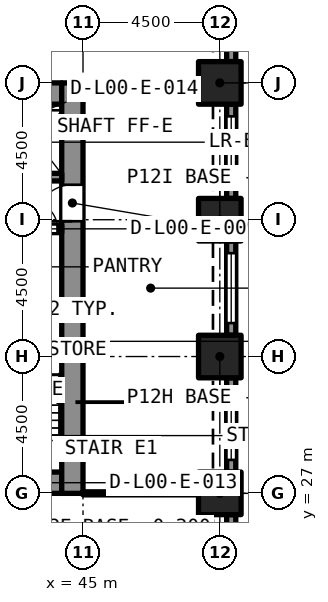
"""IFC4 building model, lengths in metres.
Left out: names, types, materials, properties, quantities, classifications, styles, units other than length and angle.
Written with IfcOpenShell. Run it as: python <this file> out.ifc"""

import sys

from ifc_helpers import new_model, si_unit, direction, frame, frame_2d, origin, origin_2d, place, context, subcontext, project, spatial, rectangle, extrude, element, fill, save


model = new_model("IFC4")
c1 = context("Model", 3, precision=1e-05, world=origin(), true_north=direction((0.0, 1.0)))
c2 = subcontext(c1, "Body", "Model", "MODEL_VIEW")
j1 = project(units=[si_unit("LENGTHUNIT", "METRE"), si_unit("PLANEANGLEUNIT", "RADIAN")], contexts=[c1])
p1 = place(None, origin())
s1 = spatial("IfcSite", under=j1, at=p1, CompositionType="ELEMENT")
p2 = place(p1, origin())
s2 = spatial("IfcBuilding", under=s1, at=p2, CompositionType="ELEMENT")
p3 = place(p2, origin())
s3 = spatial("IfcBuildingStorey", under=s2, at=p3, CompositionType="ELEMENT", Elevation=0.0)
for number, where, z_axis, x_axis in (
    (1, (49.5, 27.0, -0.3), (0.0, 0.0, 1.0), (1.0, 0.0, 0.0)),
    (2, (49.5, 31.5, -0.3), (0.0, 0.0, 1.0), (1.0, 0.0, 0.0)),
    (3, (49.5, 36.0, -0.3), (0.0, 0.0, 1.0), (1.0, 0.0, 0.0)),
    (4, (49.5, 40.5, -0.3), (0.0, 0.0, 1.0), (1.0, 0.0, 0.0)),
):
    element("IfcColumn", number, at=place(p3, frame(where, z_axis=z_axis, x_axis=x_axis)), inside=s3, PredefinedType="COLUMN", context=c2, shape_type="SweptSolid", body=[
        extrude(rectangle(XDim=1.4, YDim=1.4, at=origin_2d()), origin(), (0.0, 0.0, 1.0), 6.3),
    ])
p4 = place(p3, frame((36.7, 27.35, -0.3), z_axis=(0.0, 0.0, 1.0), x_axis=(1.0, 0.0, 0.0)))
e5 = element("IfcWall", 5, at=p4, inside=s3, PredefinedType="SOLIDWALL", context=c2, shape_type="SweptSolid", body=[
    extrude(rectangle(XDim=7.6, YDim=0.7, at=frame_2d((3.8, 0.0))), origin(), (0.0, 0.0, 1.0), 6.3),
])
p5 = place(p4, frame((5.775, 0.0, 0.3)))
e6 = element("IfcOpeningElement", 6, at=p5, cuts=e5, PredefinedType="OPENING", context=c2, shape_type="SweptSolid", body=[
    extrude(rectangle(XDim=1.1, YDim=2.1, at=frame_2d((0.55, 1.05))), frame((0.0, 0.36, 0.0), z_axis=(0.0, -1.0, 0.0), x_axis=(1.0, 0.0, 0.0)), (0.0, 0.0, 1.0), 0.72),
])
p6 = place(p4, frame((3.25, 0.0, 0.3)))
e7 = element("IfcOpeningElement", 7, at=p6, cuts=e5, PredefinedType="OPENING", context=c2, shape_type="SweptSolid", body=[
    extrude(rectangle(XDim=1.1, YDim=2.1, at=frame_2d((0.55, 1.05))), frame((0.0, 0.36, 0.0), z_axis=(0.0, -1.0, 0.0), x_axis=(1.0, 0.0, 0.0)), (0.0, 0.0, 1.0), 0.72),
])
p7 = place(p4, frame((0.725, 0.0, 0.3)))
e8 = element("IfcOpeningElement", 8, at=p7, cuts=e5, PredefinedType="OPENING", context=c2, shape_type="SweptSolid", body=[
    extrude(rectangle(XDim=1.1, YDim=2.1, at=frame_2d((0.55, 1.05))), frame((0.0, 0.36, 0.0), z_axis=(0.0, -1.0, 0.0), x_axis=(1.0, 0.0, 0.0)), (0.0, 0.0, 1.0), 0.72),
])
p8 = place(p3, frame((36.7, 40.15, -0.3), z_axis=(0.0, 0.0, 1.0), x_axis=(1.0, 0.0, 0.0)))
e9 = element("IfcWall", 9, at=p8, inside=s3, PredefinedType="SOLIDWALL", context=c2, shape_type="SweptSolid", body=[
    extrude(rectangle(XDim=7.6, YDim=0.7, at=frame_2d((3.8, 0.0))), origin(), (0.0, 0.0, 1.0), 6.3),
])
p9 = place(p3, frame((44.65, 27.0, -0.3), z_axis=(0.0, 0.0, 1.0), x_axis=(0.0, 1.0, 0.0)))
e10 = element("IfcWall", 10, at=p9, inside=s3, PredefinedType="SOLIDWALL", context=c2, shape_type="SweptSolid", body=[
    extrude(rectangle(XDim=13.5, YDim=0.7, at=frame_2d((6.75, 0.0))), origin(), (0.0, 0.0, 1.0), 6.3),
])
p10 = place(p9, frame((8.95, 0.0, 0.3)))
e11 = element("IfcOpeningElement", 11, at=p10, cuts=e10, PredefinedType="OPENING", context=c2, shape_type="SweptSolid", body=[
    extrude(rectangle(XDim=1.2, YDim=2.1, at=frame_2d((0.6, 1.05))), frame((0.0, 0.36, 0.0), z_axis=(0.0, -1.0, 0.0), x_axis=(1.0, 0.0, 0.0)), (0.0, 0.0, 1.0), 0.72),
])
p11 = place(p3, frame((49.875, 26.3, 0.0), z_axis=(0.0, 0.0, 1.0), x_axis=(0.0, -1.0, 0.0)))
e12 = element("IfcWall", 12, at=p11, inside=s3, PredefinedType="SOLIDWALL", context=c2, shape_type="SweptSolid", body=[
    extrude(rectangle(XDim=3.1, YDim=0.3, at=frame_2d((1.55, 0.0))), origin(), (0.0, 0.0, 1.0), 6.0),
])
p12 = place(p11, frame((0.4, 0.0, 0.45)))
e13 = element("IfcOpeningElement", 13, at=p12, cuts=e12, PredefinedType="OPENING", context=c2, shape_type="SweptSolid", body=[
    extrude(rectangle(XDim=2.3, YDim=3.3, at=frame_2d((1.15, 1.65))), frame((0.0, 0.16, 0.0), z_axis=(0.0, -1.0, 0.0), x_axis=(1.0, 0.0, 0.0)), (0.0, 0.0, 1.0), 0.32),
])
p13 = place(p3, frame((49.875, 30.8, 0.0), z_axis=(0.0, 0.0, 1.0), x_axis=(0.0, -1.0, 0.0)))
e14 = element("IfcWall", 14, at=p13, inside=s3, PredefinedType="SOLIDWALL", context=c2, shape_type="SweptSolid", body=[
    extrude(rectangle(XDim=3.1, YDim=0.3, at=frame_2d((1.55, 0.0))), origin(), (0.0, 0.0, 1.0), 6.0),
])
p14 = place(p13, frame((0.4, 0.0, 0.45)))
e15 = element("IfcOpeningElement", 15, at=p14, cuts=e14, PredefinedType="OPENING", context=c2, shape_type="SweptSolid", body=[
    extrude(rectangle(XDim=2.3, YDim=3.3, at=frame_2d((1.15, 1.65))), frame((0.0, 0.16, 0.0), z_axis=(0.0, -1.0, 0.0), x_axis=(1.0, 0.0, 0.0)), (0.0, 0.0, 1.0), 0.32),
])
p15 = place(p3, frame((49.875, 35.3, 0.0), z_axis=(0.0, 0.0, 1.0), x_axis=(0.0, -1.0, 0.0)))
e16 = element("IfcWall", 16, at=p15, inside=s3, PredefinedType="SOLIDWALL", context=c2, shape_type="SweptSolid", body=[
    extrude(rectangle(XDim=3.1, YDim=0.3, at=frame_2d((1.55, 0.0))), origin(), (0.0, 0.0, 1.0), 6.0),
])
p16 = place(p15, frame((0.4, 0.0, 0.45)))
e17 = element("IfcOpeningElement", 17, at=p16, cuts=e16, PredefinedType="OPENING", context=c2, shape_type="SweptSolid", body=[
    extrude(rectangle(XDim=2.3, YDim=3.3, at=frame_2d((1.15, 1.65))), frame((0.0, 0.16, 0.0), z_axis=(0.0, -1.0, 0.0), x_axis=(1.0, 0.0, 0.0)), (0.0, 0.0, 1.0), 0.32),
])
p17 = place(p3, frame((49.875, 39.8, 0.0), z_axis=(0.0, 0.0, 1.0), x_axis=(0.0, -1.0, 0.0)))
e18 = element("IfcWall", 18, at=p17, inside=s3, PredefinedType="SOLIDWALL", context=c2, shape_type="SweptSolid", body=[
    extrude(rectangle(XDim=3.1, YDim=0.3, at=frame_2d((1.55, 0.0))), origin(), (0.0, 0.0, 1.0), 6.0),
])
p18 = place(p17, frame((0.4, 0.0, 0.45)))
e19 = element("IfcOpeningElement", 19, at=p18, cuts=e18, PredefinedType="OPENING", context=c2, shape_type="SweptSolid", body=[
    extrude(rectangle(XDim=2.3, YDim=3.3, at=frame_2d((1.15, 1.65))), frame((0.0, 0.16, 0.0), z_axis=(0.0, -1.0, 0.0), x_axis=(1.0, 0.0, 0.0)), (0.0, 0.0, 1.0), 0.32),
])
p19 = place(p3, frame((49.875, 44.3, 0.0), z_axis=(0.0, 0.0, 1.0), x_axis=(0.0, -1.0, 0.0)))
e20 = element("IfcWall", 20, at=p19, inside=s3, PredefinedType="SOLIDWALL", context=c2, shape_type="SweptSolid", body=[
    extrude(rectangle(XDim=3.1, YDim=0.3, at=frame_2d((1.55, 0.0))), origin(), (0.0, 0.0, 1.0), 6.0),
])
p20 = place(p19, frame((0.4, 0.0, 0.45)))
e21 = element("IfcOpeningElement", 21, at=p20, cuts=e20, PredefinedType="OPENING", context=c2, shape_type="SweptSolid", body=[
    extrude(rectangle(XDim=2.3, YDim=3.3, at=frame_2d((1.15, 1.65))), frame((0.0, 0.16, 0.0), z_axis=(0.0, -1.0, 0.0), x_axis=(1.0, 0.0, 0.0)), (0.0, 0.0, 1.0), 0.32),
])
p21 = place(p3, frame((50.5, 9.3, 0.0), z_axis=(0.0, 0.0, 1.0), x_axis=(0.0, 1.0, 0.0)))
e22 = element("IfcWall", 22, at=p21, inside=s3, PredefinedType="SOLIDWALL", context=c2, shape_type="SweptSolid", body=[
    extrude(rectangle(XDim=35.4, YDim=0.3, at=frame_2d((17.7, 0.0))), origin(), (0.0, 0.0, 1.0), 5.7),
])
p22 = place(p3, frame((36.7, 33.2, 0.0), z_axis=(0.0, 0.0, 1.0), x_axis=(1.0, 0.0, 0.0)))
e23 = element("IfcWall", 23, at=p22, inside=s3, PredefinedType="SOLIDWALL", context=c2, shape_type="SweptSolid", body=[
    extrude(rectangle(XDim=7.6, YDim=0.25, at=frame_2d((3.8, 0.0))), origin(), (0.0, 0.0, 1.0), 5.65),
])
p23 = place(p22, frame((3.3, 0.0, 0.0)))
e24 = element("IfcOpeningElement", 24, at=p23, cuts=e23, PredefinedType="OPENING", context=c2, shape_type="SweptSolid", body=[
    extrude(rectangle(XDim=1.0, YDim=2.1, at=frame_2d((0.5, 1.05))), frame((0.0, 0.135, 0.0), z_axis=(0.0, -1.0, 0.0), x_axis=(1.0, 0.0, 0.0)), (0.0, 0.0, 1.0), 0.27),
])
p24 = place(p3, frame((36.7, 35.7, 0.0), z_axis=(0.0, 0.0, 1.0), x_axis=(1.0, 0.0, 0.0)))
e25 = element("IfcWall", 25, at=p24, inside=s3, PredefinedType="SOLIDWALL", context=c2, shape_type="SweptSolid", body=[
    extrude(rectangle(XDim=7.6, YDim=0.25, at=frame_2d((3.8, 0.0))), origin(), (0.0, 0.0, 1.0), 5.65),
])
p25 = place(p24, frame((6.562, 0.0, 0.0)))
e26 = element("IfcOpeningElement", 26, at=p25, cuts=e25, PredefinedType="OPENING", context=c2, shape_type="SweptSolid", body=[
    extrude(rectangle(XDim=0.9, YDim=2.1, at=frame_2d((0.45, 1.05))), frame((0.0, 0.135, 0.0), z_axis=(0.0, -1.0, 0.0), x_axis=(1.0, 0.0, 0.0)), (0.0, 0.0, 1.0), 0.27),
])
p26 = place(p24, frame((5.188, 0.0, 0.0)))
e27 = element("IfcOpeningElement", 27, at=p26, cuts=e25, PredefinedType="OPENING", context=c2, shape_type="SweptSolid", body=[
    extrude(rectangle(XDim=0.9, YDim=2.1, at=frame_2d((0.45, 1.05))), frame((0.0, 0.135, 0.0), z_axis=(0.0, -1.0, 0.0), x_axis=(1.0, 0.0, 0.0)), (0.0, 0.0, 1.0), 0.27),
])
p27 = place(p24, frame((1.512, 0.0, 0.0)))
e28 = element("IfcOpeningElement", 28, at=p27, cuts=e25, PredefinedType="OPENING", context=c2, shape_type="SweptSolid", body=[
    extrude(rectangle(XDim=0.9, YDim=2.1, at=frame_2d((0.45, 1.05))), frame((0.0, 0.135, 0.0), z_axis=(0.0, -1.0, 0.0), x_axis=(1.0, 0.0, 0.0)), (0.0, 0.0, 1.0), 0.27),
])
p28 = place(p24, frame((0.137, 0.0, 0.0)))
e29 = element("IfcOpeningElement", 29, at=p28, cuts=e25, PredefinedType="OPENING", context=c2, shape_type="SweptSolid", body=[
    extrude(rectangle(XDim=0.9, YDim=2.1, at=frame_2d((0.45, 1.05))), frame((0.0, 0.135, 0.0), z_axis=(0.0, -1.0, 0.0), x_axis=(1.0, 0.0, 0.0)), (0.0, 0.0, 1.0), 0.27),
])
p29 = place(p3, frame((36.7, 37.4, 0.0), z_axis=(0.0, 0.0, 1.0), x_axis=(1.0, 0.0, 0.0)))
e30 = element("IfcWall", 30, at=p29, inside=s3, PredefinedType="SOLIDWALL", context=c2, shape_type="SweptSolid", body=[
    extrude(rectangle(XDim=7.6, YDim=0.25, at=frame_2d((3.8, 0.0))), origin(), (0.0, 0.0, 1.0), 5.65),
])
p30 = place(p29, frame((5.8, 0.0, 0.0)))
e31 = element("IfcOpeningElement", 31, at=p30, cuts=e30, PredefinedType="OPENING", context=c2, shape_type="SweptSolid", body=[
    extrude(rectangle(XDim=1.1, YDim=2.4, at=frame_2d((0.55, 1.2))), frame((0.0, 0.135, 0.0), z_axis=(0.0, -1.0, 0.0), x_axis=(1.0, 0.0, 0.0)), (0.0, 0.0, 1.0), 0.27),
])
p31 = place(p29, frame((3.1, 0.0, 0.0)))
e32 = element("IfcOpeningElement", 32, at=p31, cuts=e30, PredefinedType="OPENING", context=c2, shape_type="SweptSolid", body=[
    extrude(rectangle(XDim=1.1, YDim=2.4, at=frame_2d((0.55, 1.2))), frame((0.0, 0.135, 0.0), z_axis=(0.0, -1.0, 0.0), x_axis=(1.0, 0.0, 0.0)), (0.0, 0.0, 1.0), 0.27),
])
p32 = place(p29, frame((0.75, 0.0, 0.0)))
e33 = element("IfcOpeningElement", 33, at=p32, cuts=e30, PredefinedType="OPENING", context=c2, shape_type="SweptSolid", body=[
    extrude(rectangle(XDim=0.7, YDim=2.1, at=frame_2d((0.35, 1.05))), frame((0.0, 0.135, 0.0), z_axis=(0.0, -1.0, 0.0), x_axis=(1.0, 0.0, 0.0)), (0.0, 0.0, 1.0), 0.27),
])
p33 = place(p3, frame((45.0, 27.0, 0.0), z_axis=(0.0, 0.0, 1.0), x_axis=(1.0, 0.0, 0.0)))
e34 = element("IfcWall", 34, at=p33, inside=s3, PredefinedType="PARTITIONING", context=c2, shape_type="SweptSolid", body=[
    extrude(rectangle(XDim=3.8, YDim=0.1, at=frame_2d((1.9, 0.0))), origin(), (0.0, 0.0, 1.0), 5.65),
])
p34 = place(p14, origin())
e35 = element("IfcWindow", 35, at=p34, inside=s3, PartitioningType="SINGLE_PANEL", PredefinedType="WINDOW", context=c2, shape_type="SweptSolid", body=[
    extrude(rectangle(XDim=2.3, YDim=3.3, at=frame_2d((1.15, 1.65))), frame((0.0, 0.03, 0.0), z_axis=(0.0, -1.0, 0.0), x_axis=(1.0, 0.0, 0.0)), (0.0, 0.0, 1.0), 0.06),
])
fill(e15, e35)
p35 = place(p16, origin())
e36 = element("IfcWindow", 36, at=p35, inside=s3, PartitioningType="SINGLE_PANEL", PredefinedType="WINDOW", context=c2, shape_type="SweptSolid", body=[
    extrude(rectangle(XDim=2.3, YDim=3.3, at=frame_2d((1.15, 1.65))), frame((0.0, 0.03, 0.0), z_axis=(0.0, -1.0, 0.0), x_axis=(1.0, 0.0, 0.0)), (0.0, 0.0, 1.0), 0.06),
])
fill(e17, e36)
p36 = place(p18, origin())
e37 = element("IfcWindow", 37, at=p36, inside=s3, PartitioningType="SINGLE_PANEL", PredefinedType="WINDOW", context=c2, shape_type="SweptSolid", body=[
    extrude(rectangle(XDim=2.3, YDim=3.3, at=frame_2d((1.15, 1.65))), frame((0.0, 0.03, 0.0), z_axis=(0.0, -1.0, 0.0), x_axis=(1.0, 0.0, 0.0)), (0.0, 0.0, 1.0), 0.06),
])
fill(e19, e37)
p37 = place(p25, origin())
e38 = element("IfcDoor", 38, at=p37, inside=s3, OperationType="SINGLE_SWING_LEFT", PredefinedType="DOOR", context=c2, shape_type="SweptSolid", body=[
    extrude(rectangle(XDim=0.9, YDim=2.1, at=frame_2d((0.45, 1.05))), frame((0.0, 0.025, 0.0), z_axis=(0.0, -1.0, 0.0), x_axis=(1.0, 0.0, 0.0)), (0.0, 0.0, 1.0), 0.05),
])
fill(e26, e38)
p38 = place(p10, origin())
e39 = element("IfcDoor", 39, at=p38, inside=s3, OperationType="SINGLE_SWING_LEFT", PredefinedType="DOOR", context=c2, shape_type="SweptSolid", body=[
    extrude(rectangle(XDim=1.2, YDim=2.1, at=frame_2d((0.6, 1.05))), frame((0.0, 0.025, 0.0), z_axis=(0.0, -1.0, 0.0), x_axis=(1.0, 0.0, 0.0)), (0.0, 0.0, 1.0), 0.05),
])
fill(e11, e39)
save(model, sys.argv[1])
